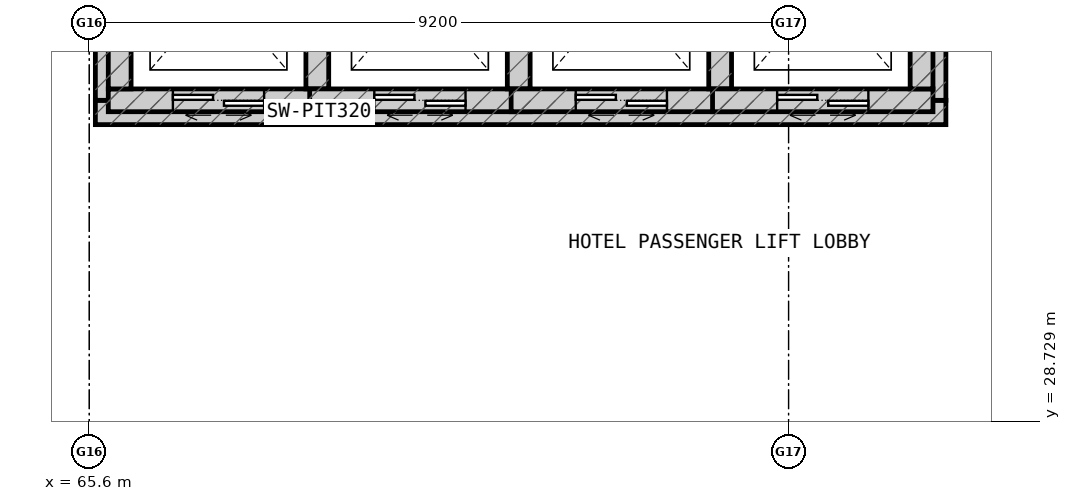
"""IFC4 building model, lengths in metres.
Left out: names, types, materials, properties, quantities, classifications, styles, units other than length and angle.
Written with IfcOpenShell. Run it as: python <this file> out.ifc"""

import sys

from ifc_helpers import new_model, si_unit, direction, frame, frame_2d, origin, place, context, subcontext, project, spatial, rectangle, extrude, element, fill, save


model = new_model("IFC4")
c1 = context("Model", 3, precision=1e-05, world=origin(), true_north=direction((0.0, 1.0)))
c2 = subcontext(c1, "Body", "Model", "MODEL_VIEW")
j1 = project(units=[si_unit("LENGTHUNIT", "METRE"), si_unit("PLANEANGLEUNIT", "RADIAN")], contexts=[c1])
p1 = place(None, origin())
s1 = spatial("IfcSite", under=j1, at=p1, CompositionType="ELEMENT")
p2 = place(p1, origin())
s2 = spatial("IfcBuilding", under=s1, at=p2, CompositionType="ELEMENT")
p3 = place(p2, frame((0.0, 0.0, -4.5)))
s3 = spatial("IfcBuildingStorey", under=s2, at=p3, CompositionType="ELEMENT", Elevation=-4.5)
p4 = place(p3, frame((65.68, 32.79, -1.18), z_axis=(0.0, 0.0, 1.0), x_axis=(1.0, 0.0, 0.0)))
e1 = element("IfcWall", 1, at=p4, inside=s3, PredefinedType="SHEAR", context=c2, shape_type="SweptSolid", body=[
    extrude(rectangle(XDim=11.19, YDim=0.32, at=frame_2d((5.595, 0.0))), origin(), (0.0, 0.0, 1.0), 1.18),
])
for number, where, z_axis, x_axis in (
    (2, (76.71, 32.95, -1.18), (0.0, 0.0, 1.0), (0.0, 1.0, 0.0)),
    (3, (65.84, 35.85, -1.18), (0.0, 0.0, 1.0), (0.0, -1.0, 0.0)),
):
    element("IfcWall", number, at=place(p3, frame(where, z_axis=z_axis, x_axis=x_axis)), inside=s3, PredefinedType="SHEAR", context=c2, shape_type="SweptSolid", body=[
        extrude(rectangle(XDim=2.9, YDim=0.32, at=frame_2d((1.45, 0.0))), origin(), (0.0, 0.0, 1.0), 1.18),
    ])
p5 = place(p3, frame((65.85, 32.95, 0.0), z_axis=(0.0, 0.0, 1.0), x_axis=(1.0, 0.0, 0.0)))
e4 = element("IfcWall", 4, at=p5, inside=s3, PredefinedType="SHEAR", context=c2, shape_type="SweptSolid", body=[
    extrude(rectangle(XDim=2.9, YDim=0.3, at=frame_2d((1.45, 0.0))), origin(), (0.0, 0.0, 1.0), 4.5),
])
p6 = place(p5, frame((0.85, 0.0, 0.0)))
e5 = element("IfcOpeningElement", 5, at=p6, cuts=e4, PredefinedType="OPENING", context=c2, shape_type="SweptSolid", body=[
    extrude(rectangle(XDim=1.2, YDim=2.2, at=frame_2d((0.6, 1.1))), frame((0.0, 0.162, 0.0), z_axis=(0.0, -1.0, 0.0), x_axis=(1.0, 0.0, 0.0)), (0.0, 0.0, 1.0), 0.324),
])
for number, where, z_axis, x_axis in (
    (6, (68.6, 33.1, 0.0), (0.0, 0.0, 1.0), (0.0, 1.0, 0.0)),
    (7, (66.0, 35.7, 0.0), (0.0, 0.0, 1.0), (0.0, -1.0, 0.0)),
):
    element("IfcWall", number, at=place(p3, frame(where, z_axis=z_axis, x_axis=x_axis)), inside=s3, PredefinedType="SHEAR", context=c2, shape_type="SweptSolid", body=[
        extrude(rectangle(XDim=2.6, YDim=0.3, at=frame_2d((1.3, 0.0))), origin(), (0.0, 0.0, 1.0), 4.5),
    ])
p7 = place(p3, frame((68.5, 32.95, 0.0), z_axis=(0.0, 0.0, 1.0), x_axis=(1.0, 0.0, 0.0)))
e8 = element("IfcWall", 8, at=p7, inside=s3, PredefinedType="SHEAR", context=c2, shape_type="SweptSolid", body=[
    extrude(rectangle(XDim=2.9, YDim=0.3, at=frame_2d((1.45, 0.0))), origin(), (0.0, 0.0, 1.0), 4.5),
])
p8 = place(p7, frame((0.85, 0.0, 0.0)))
e9 = element("IfcOpeningElement", 9, at=p8, cuts=e8, PredefinedType="OPENING", context=c2, shape_type="SweptSolid", body=[
    extrude(rectangle(XDim=1.2, YDim=2.2, at=frame_2d((0.6, 1.1))), frame((0.0, 0.162, 0.0), z_axis=(0.0, -1.0, 0.0), x_axis=(1.0, 0.0, 0.0)), (0.0, 0.0, 1.0), 0.324),
])
p9 = place(p3, frame((71.25, 33.1, 0.0), z_axis=(0.0, 0.0, 1.0), x_axis=(0.0, 1.0, 0.0)))
e10 = element("IfcWall", 10, at=p9, inside=s3, PredefinedType="SHEAR", context=c2, shape_type="SweptSolid", body=[
    extrude(rectangle(XDim=2.6, YDim=0.3, at=frame_2d((1.3, 0.0))), origin(), (0.0, 0.0, 1.0), 4.5),
])
p10 = place(p3, frame((71.15, 32.95, 0.0), z_axis=(0.0, 0.0, 1.0), x_axis=(1.0, 0.0, 0.0)))
e11 = element("IfcWall", 11, at=p10, inside=s3, PredefinedType="SHEAR", context=c2, shape_type="SweptSolid", body=[
    extrude(rectangle(XDim=2.9, YDim=0.3, at=frame_2d((1.45, 0.0))), origin(), (0.0, 0.0, 1.0), 4.5),
])
p11 = place(p10, frame((0.85, 0.0, 0.0)))
e12 = element("IfcOpeningElement", 12, at=p11, cuts=e11, PredefinedType="OPENING", context=c2, shape_type="SweptSolid", body=[
    extrude(rectangle(XDim=1.2, YDim=2.2, at=frame_2d((0.6, 1.1))), frame((0.0, 0.162, 0.0), z_axis=(0.0, -1.0, 0.0), x_axis=(1.0, 0.0, 0.0)), (0.0, 0.0, 1.0), 0.324),
])
p12 = place(p3, frame((73.9, 33.1, 0.0), z_axis=(0.0, 0.0, 1.0), x_axis=(0.0, 1.0, 0.0)))
e13 = element("IfcWall", 13, at=p12, inside=s3, PredefinedType="SHEAR", context=c2, shape_type="SweptSolid", body=[
    extrude(rectangle(XDim=2.6, YDim=0.3, at=frame_2d((1.3, 0.0))), origin(), (0.0, 0.0, 1.0), 4.5),
])
p13 = place(p3, frame((73.8, 32.95, 0.0), z_axis=(0.0, 0.0, 1.0), x_axis=(1.0, 0.0, 0.0)))
e14 = element("IfcWall", 14, at=p13, inside=s3, PredefinedType="SHEAR", context=c2, shape_type="SweptSolid", body=[
    extrude(rectangle(XDim=2.9, YDim=0.3, at=frame_2d((1.45, 0.0))), origin(), (0.0, 0.0, 1.0), 4.5),
])
p14 = place(p13, frame((0.85, 0.0, 0.0)))
e15 = element("IfcOpeningElement", 15, at=p14, cuts=e14, PredefinedType="OPENING", context=c2, shape_type="SweptSolid", body=[
    extrude(rectangle(XDim=1.2, YDim=2.2, at=frame_2d((0.6, 1.1))), frame((0.0, 0.162, 0.0), z_axis=(0.0, -1.0, 0.0), x_axis=(1.0, 0.0, 0.0)), (0.0, 0.0, 1.0), 0.324),
])
p15 = place(p3, frame((76.55, 33.1, 0.0), z_axis=(0.0, 0.0, 1.0), x_axis=(0.0, 1.0, 0.0)))
e16 = element("IfcWall", 16, at=p15, inside=s3, PredefinedType="SHEAR", context=c2, shape_type="SweptSolid", body=[
    extrude(rectangle(XDim=2.6, YDim=0.3, at=frame_2d((1.3, 0.0))), origin(), (0.0, 0.0, 1.0), 4.5),
])
p16 = place(p6, origin())
e17 = element("IfcDoor", 17, at=p16, inside=s3, OperationType="DOUBLE_DOOR_SLIDING", PredefinedType="DOOR", context=c2, shape_type="SweptSolid", body=[
    extrude(rectangle(XDim=1.2, YDim=2.2, at=frame_2d((0.6, 1.1))), frame((0.0, 0.025, 0.0), z_axis=(0.0, -1.0, 0.0), x_axis=(1.0, 0.0, 0.0)), (0.0, 0.0, 1.0), 0.05),
])
fill(e5, e17)
p17 = place(p8, origin())
e18 = element("IfcDoor", 18, at=p17, inside=s3, OperationType="DOUBLE_DOOR_SLIDING", PredefinedType="DOOR", context=c2, shape_type="SweptSolid", body=[
    extrude(rectangle(XDim=1.2, YDim=2.2, at=frame_2d((0.6, 1.1))), frame((0.0, 0.025, 0.0), z_axis=(0.0, -1.0, 0.0), x_axis=(1.0, 0.0, 0.0)), (0.0, 0.0, 1.0), 0.05),
])
fill(e9, e18)
p18 = place(p11, origin())
e19 = element("IfcDoor", 19, at=p18, inside=s3, OperationType="DOUBLE_DOOR_SLIDING", PredefinedType="DOOR", context=c2, shape_type="SweptSolid", body=[
    extrude(rectangle(XDim=1.2, YDim=2.2, at=frame_2d((0.6, 1.1))), frame((0.0, 0.025, 0.0), z_axis=(0.0, -1.0, 0.0), x_axis=(1.0, 0.0, 0.0)), (0.0, 0.0, 1.0), 0.05),
])
fill(e12, e19)
p19 = place(p14, origin())
e20 = element("IfcDoor", 20, at=p19, inside=s3, OperationType="DOUBLE_DOOR_SLIDING", PredefinedType="DOOR", context=c2, shape_type="SweptSolid", body=[
    extrude(rectangle(XDim=1.2, YDim=2.2, at=frame_2d((0.6, 1.1))), frame((0.0, 0.025, 0.0), z_axis=(0.0, -1.0, 0.0), x_axis=(1.0, 0.0, 0.0)), (0.0, 0.0, 1.0), 0.05),
])
fill(e15, e20)
save(model, sys.argv[1])
